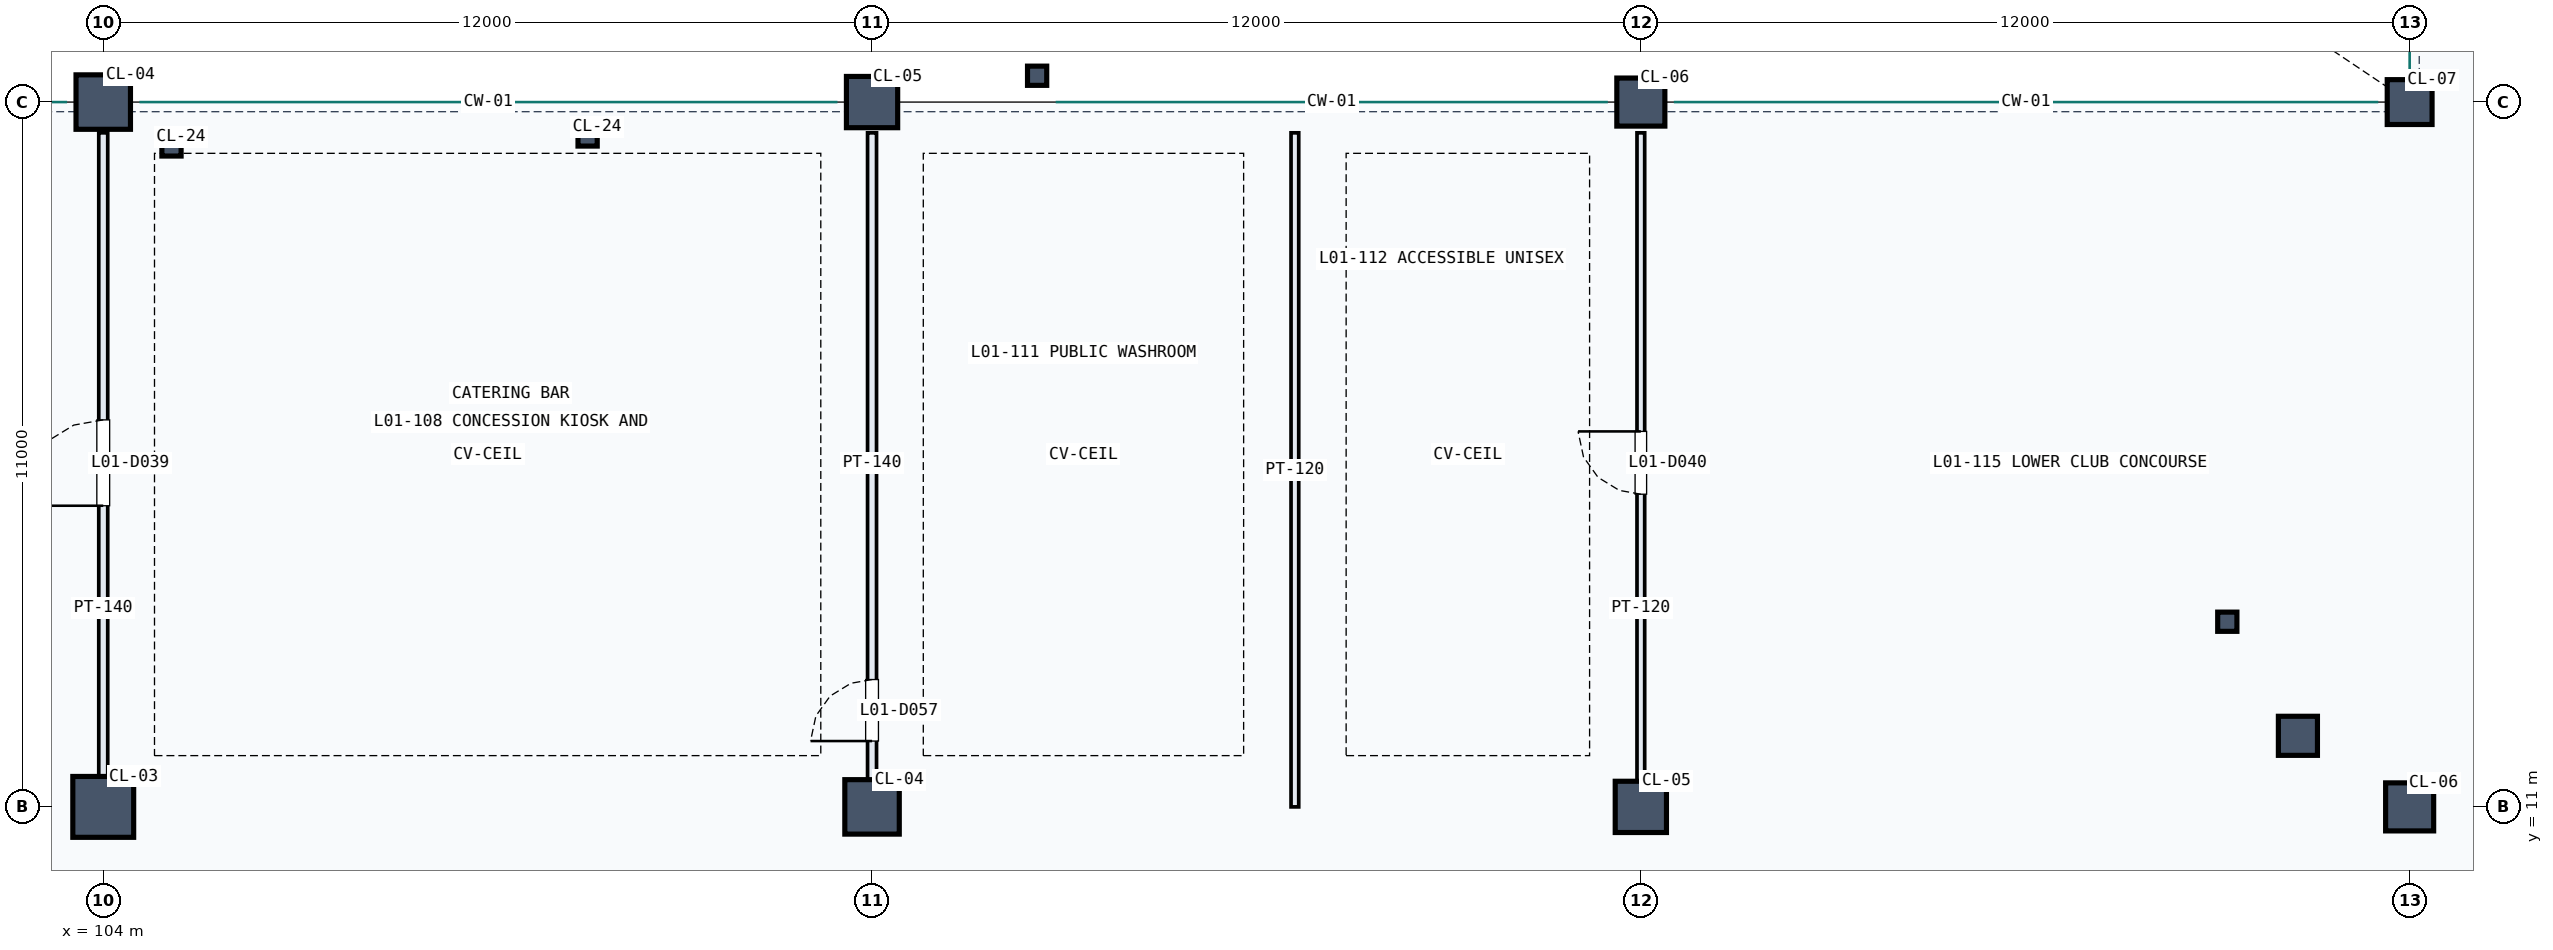
"""IFC4 building model, lengths in metres.
Left out: names, types, materials, properties, quantities, classifications, styles, units other than length and angle.
Written with IfcOpenShell. Run it as: python <this file> out.ifc"""

import sys

from ifc_helpers import new_model, si_unit, direction, frame, frame_2d, origin, origin_2d, place, context, subcontext, project, spatial, rectangle, hollow_rectangle, hollow_circle, extrude, element, fill, save


model = new_model("IFC4")
c1 = context("Model", 3, precision=1e-05, world=origin(), true_north=direction((0.0, 1.0)))
c2 = subcontext(c1, "Body", "Model", "MODEL_VIEW")
j1 = project(units=[si_unit("LENGTHUNIT", "METRE"), si_unit("PLANEANGLEUNIT", "RADIAN")], contexts=[c1])
p1 = place(None, origin())
s1 = spatial("IfcSite", under=j1, at=p1, CompositionType="ELEMENT")
p2 = place(p1, origin())
s2 = spatial("IfcBuilding", under=s1, at=p2, CompositionType="ELEMENT")
p3 = place(p2, frame((0.0, 0.0, 5.4)))
s3 = spatial("IfcBuildingStorey", under=s2, at=p3, CompositionType="ELEMENT", Elevation=5.4)
p4 = place(p3, frame((104.0, 11.0, 0.0), z_axis=(0.0, 0.0, 1.0), x_axis=(1.0, 0.0, 0.0)))
e1 = element("IfcColumn", 1, at=p4, inside=s3, PredefinedType="COLUMN", context=c2, shape_type="SweptSolid", body=[
    extrude(rectangle(XDim=0.95, YDim=0.95, at=origin_2d()), origin(), (0.0, 0.0, 1.0), 4.8),
])
for number, where, z_axis, x_axis in (
    (2, (104.0, 22.0, 0.0), (0.0, 0.0, 1.0), (1.0, 0.0, 0.0)),
    (3, (116.0, 11.0, 0.0), (0.0, 0.0, 1.0), (1.0, 0.0, 0.0)),
):
    element("IfcColumn", number, at=place(p3, frame(where, z_axis=z_axis, x_axis=x_axis)), inside=s3, PredefinedType="COLUMN", context=c2, shape_type="SweptSolid", body=[
        extrude(rectangle(XDim=0.85, YDim=0.85, at=origin_2d()), origin(), (0.0, 0.0, 1.0), 4.8),
    ])
for number, where, z_axis, x_axis in (
    (4, (116.0, 22.0, 0.0), (0.0, 0.0, 1.0), (1.0, 0.0, 0.0)),
    (5, (128.0, 11.0, 0.0), (0.0, 0.0, 1.0), (1.0, 0.0, 0.0)),
):
    element("IfcColumn", number, at=place(p3, frame(where, z_axis=z_axis, x_axis=x_axis)), inside=s3, PredefinedType="COLUMN", context=c2, shape_type="SweptSolid", body=[
        extrude(rectangle(XDim=0.8, YDim=0.8, at=origin_2d()), origin(), (0.0, 0.0, 1.0), 4.8),
    ])
for number, where, z_axis, x_axis in (
    (6, (128.0, 22.0, 0.0), (0.0, 0.0, 1.0), (1.0, 0.0, 0.0)),
    (7, (140.0, 11.0, 0.0), (0.0, 0.0, 1.0), (1.0, 0.0, 0.0)),
):
    element("IfcColumn", number, at=place(p3, frame(where, z_axis=z_axis, x_axis=x_axis)), inside=s3, PredefinedType="COLUMN", context=c2, shape_type="SweptSolid", body=[
        extrude(rectangle(XDim=0.75, YDim=0.75, at=origin_2d()), origin(), (0.0, 0.0, 1.0), 4.8),
    ])
p5 = place(p3, frame((140.0, 22.0, 0.0), z_axis=(0.0, 0.0, 1.0), x_axis=(1.0, 0.0, 0.0)))
e8 = element("IfcColumn", 8, at=p5, inside=s3, PredefinedType="COLUMN", context=c2, shape_type="SweptSolid", body=[
    extrude(rectangle(XDim=0.7, YDim=0.7, at=origin_2d()), origin(), (0.0, 0.0, 1.0), 4.8),
])
p6 = place(p3, frame((138.256, 12.109, 0.0), z_axis=(0.0, 0.0, 1.0), x_axis=(1.0, 0.0, 0.0)))
e9 = element("IfcColumn", 9, at=p6, inside=s3, PredefinedType="COLUMN", context=c2, shape_type="SweptSolid", body=[
    extrude(hollow_circle(Radius=0.305, WallThickness=0.025, at=origin_2d()), origin(), (0.0, 0.0, 1.0), 4.8),
])
for number, where, z_axis, x_axis in (
    (10, (105.065, 21.308, 0.0), (0.0, 0.0, 1.0), (1.0, 0.0, 0.0)),
    (11, (111.56, 21.463, 0.0), (0.0, 0.0, 1.0), (1.0, 0.0, 0.0)),
    (12, (118.577, 22.411, 0.0), (0.0, 0.0, 1.0), (1.0, 0.0, 0.0)),
    (13, (137.154, 13.89, 0.0), (0.0, 0.0, 1.0), (1.0, 0.0, 0.0)),
):
    element("IfcColumn", number, at=place(p3, frame(where, z_axis=z_axis, x_axis=x_axis)), inside=s3, PredefinedType="COLUMN", context=c2, shape_type="SweptSolid", body=[
        extrude(hollow_rectangle(XDim=0.3, YDim=0.3, WallThickness=0.016, at=origin_2d()), origin(), (0.0, 0.0, 1.0), 4.8),
    ])
p7 = place(p3, frame((104.0, 11.22, 0.0), z_axis=(0.0, 0.0, 1.0), x_axis=(0.0, 1.0, 0.0)))
e14 = element("IfcWall", 14, at=p7, inside=s3, PredefinedType="PARTITIONING", context=c2, shape_type="SweptSolid", body=[
    extrude(rectangle(XDim=10.3, YDim=0.14, at=frame_2d((5.15, 0.0))), origin(), (0.0, 0.0, 1.0), 3.707),
])
p8 = place(p7, frame((4.48, 0.0, 0.0)))
e15 = element("IfcOpeningElement", 15, at=p8, cuts=e14, PredefinedType="OPENING", context=c2, shape_type="SweptSolid", body=[
    extrude(rectangle(XDim=1.34, YDim=2.15, at=frame_2d((0.67, 1.075))), frame((0.0, 0.08, 0.0), z_axis=(0.0, -1.0, 0.0), x_axis=(1.0, 0.0, 0.0)), (0.0, 0.0, 1.0), 0.16),
])
p9 = place(p3, frame((128.0, 11.22, 0.0), z_axis=(0.0, 0.0, 1.0), x_axis=(0.0, 1.0, 0.0)))
e16 = element("IfcWall", 16, at=p9, inside=s3, PredefinedType="PARTITIONING", context=c2, shape_type="SweptSolid", body=[
    extrude(rectangle(XDim=10.3, YDim=0.12, at=frame_2d((5.15, 0.0))), origin(), (0.0, 0.0, 1.0), 3.49),
])
p10 = place(p9, frame((4.66, 0.0, 0.0)))
e17 = element("IfcOpeningElement", 17, at=p10, cuts=e16, PredefinedType="OPENING", context=c2, shape_type="SweptSolid", body=[
    extrude(rectangle(XDim=0.98, YDim=2.1, at=frame_2d((0.49, 1.05))), frame((0.0, 0.07, 0.0), z_axis=(0.0, -1.0, 0.0), x_axis=(1.0, 0.0, 0.0)), (0.0, 0.0, 1.0), 0.14),
])
p11 = place(p3, frame((116.0, 11.22, 0.0), z_axis=(0.0, 0.0, 1.0), x_axis=(0.0, 1.0, 0.0)))
e18 = element("IfcWall", 18, at=p11, inside=s3, PredefinedType="PARTITIONING", context=c2, shape_type="SweptSolid", body=[
    extrude(rectangle(XDim=10.3, YDim=0.14, at=frame_2d((5.15, 0.0))), origin(), (0.0, 0.0, 1.0), 3.79),
])
p12 = place(p11, frame((0.808, 0.0, 0.0)))
e19 = element("IfcOpeningElement", 19, at=p12, cuts=e18, PredefinedType="OPENING", context=c2, shape_type="SweptSolid", body=[
    extrude(rectangle(XDim=0.96, YDim=2.15, at=frame_2d((0.48, 1.075))), frame((0.0, 0.08, 0.0), z_axis=(0.0, -1.0, 0.0), x_axis=(1.0, 0.0, 0.0)), (0.0, 0.0, 1.0), 0.16),
])
p13 = place(p3, frame((122.6, 11.0, 0.0), z_axis=(0.0, 0.0, 1.0), x_axis=(0.0, 1.0, 0.0)))
e20 = element("IfcWall", 20, at=p13, inside=s3, PredefinedType="PARTITIONING", context=c2, shape_type="SweptSolid", body=[
    extrude(rectangle(XDim=10.52, YDim=0.12, at=frame_2d((5.26, 0.0))), origin(), (0.0, 0.0, 1.0), 3.79),
])
p14 = place(p8, origin())
e21 = element("IfcDoor", 21, at=p14, inside=s3, OperationType="SINGLE_SWING_LEFT", PredefinedType="DOOR", context=c2, shape_type="SweptSolid", body=[
    extrude(rectangle(XDim=1.34, YDim=2.15, at=frame_2d((0.67, 1.075))), frame((0.0, 0.025, 0.0), z_axis=(0.0, -1.0, 0.0), x_axis=(1.0, 0.0, 0.0)), (0.0, 0.0, 1.0), 0.05),
])
fill(e15, e21)
p15 = place(p10, origin())
e22 = element("IfcDoor", 22, at=p15, inside=s3, OperationType="SINGLE_SWING_RIGHT", PredefinedType="DOOR", context=c2, shape_type="SweptSolid", body=[
    extrude(rectangle(XDim=0.98, YDim=2.1, at=frame_2d((0.49, 1.05))), frame((0.0, 0.025, 0.0), z_axis=(0.0, -1.0, 0.0), x_axis=(1.0, 0.0, 0.0)), (0.0, 0.0, 1.0), 0.05),
])
fill(e17, e22)
p16 = place(p12, origin())
e23 = element("IfcDoor", 23, at=p16, inside=s3, OperationType="SINGLE_SWING_LEFT", PredefinedType="DOOR", context=c2, shape_type="SweptSolid", body=[
    extrude(rectangle(XDim=0.96, YDim=2.15, at=frame_2d((0.48, 1.075))), frame((0.0, 0.025, 0.0), z_axis=(0.0, -1.0, 0.0), x_axis=(1.0, 0.0, 0.0)), (0.0, 0.0, 1.0), 0.05),
])
fill(e19, e23)
save(model, sys.argv[1])
